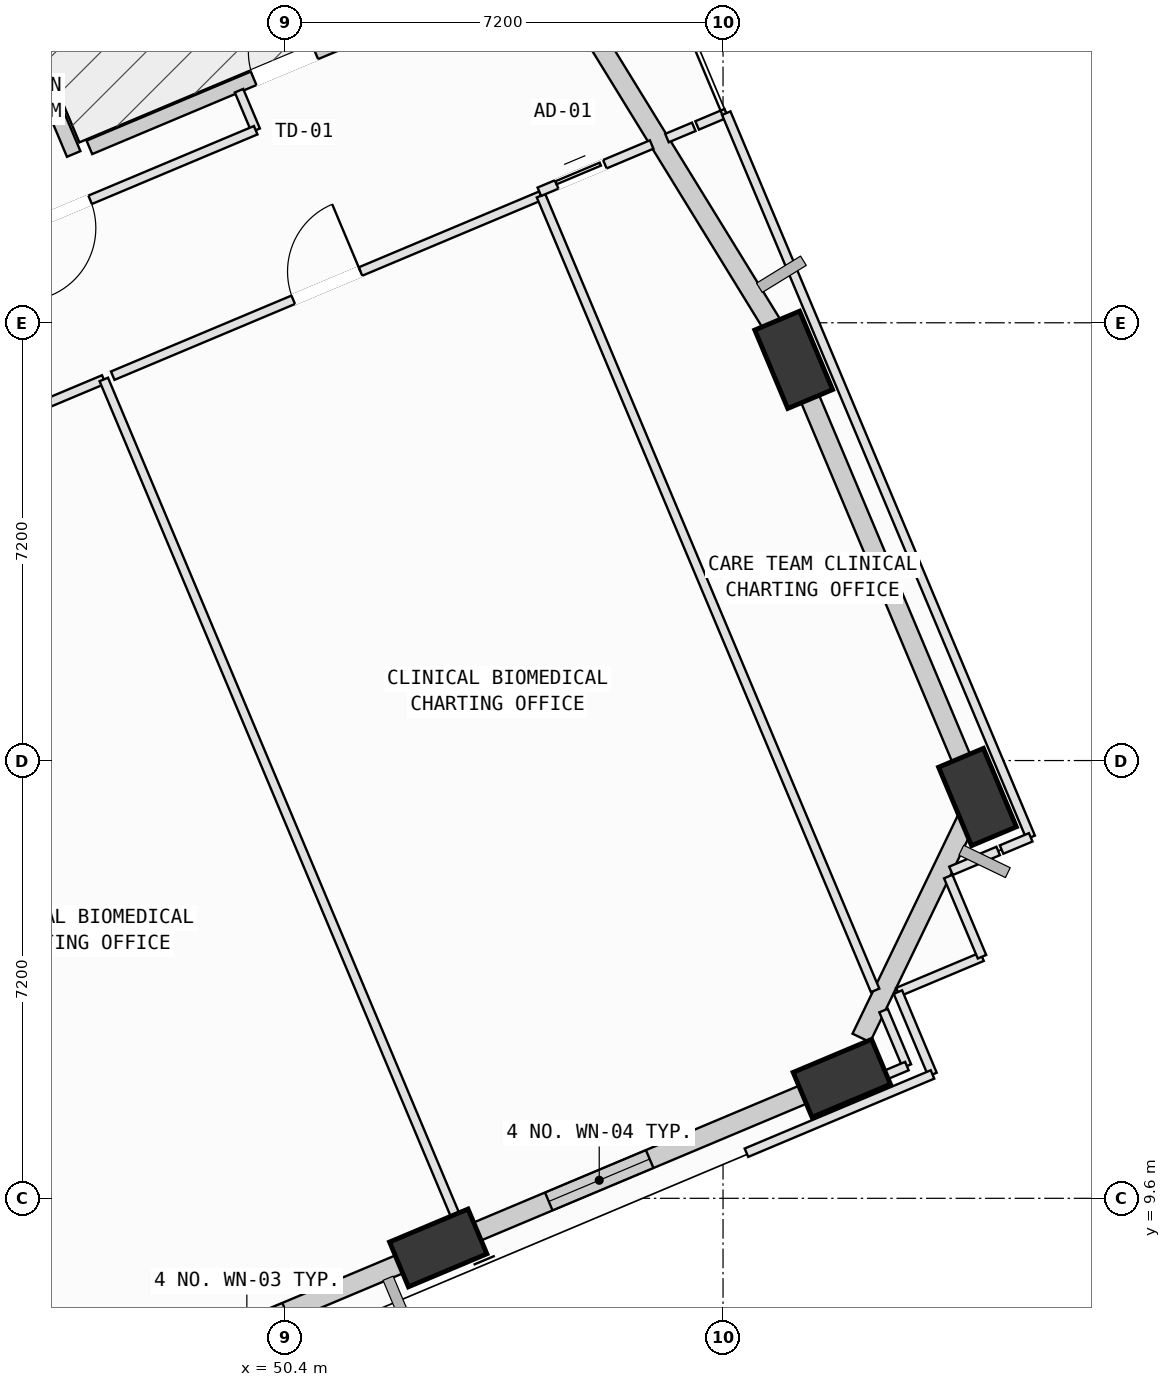
"""IFC4 building model, lengths in metres.
Left out: names, types, materials, properties, quantities, classifications, styles, units other than length and angle.
Written with IfcOpenShell. Run it as: python <this file> out.ifc"""

import sys

from ifc_helpers import new_model, si_unit, direction, frame, frame_2d, origin, origin_2d, place, context, subcontext, project, spatial, rectangle, extrude, element, fill, save


model = new_model("IFC4")
c1 = context("Model", 3, precision=1e-05, world=origin(), true_north=direction((0.0, 1.0)))
c2 = subcontext(c1, "Body", "Model", "MODEL_VIEW")
j1 = project(units=[si_unit("LENGTHUNIT", "METRE"), si_unit("PLANEANGLEUNIT", "RADIAN")], contexts=[c1])
p1 = place(None, origin())
s1 = spatial("IfcSite", under=j1, at=p1, CompositionType="ELEMENT")
p2 = place(p1, origin())
s2 = spatial("IfcBuilding", under=s1, at=p2, CompositionType="ELEMENT")
p3 = place(p2, frame((0.0, 0.0, 120.4)))
s3 = spatial("IfcBuildingStorey", under=s2, at=p3, CompositionType="ELEMENT", Elevation=120.4)
p4 = place(p3, frame((52.916, 8.784, 0.002), z_axis=(0.065381443896, 0.080146955854, 0.994636482471), x_axis=(-0.957968030834, 0.28406110417, 0.040081679075)))
e1 = element("IfcColumn", 1, at=p4, inside=s3, PredefinedType="COLUMN", context=c2, shape_type="SweptSolid", body=[
    extrude(rectangle(XDim=1.4, YDim=0.8, at=origin_2d()), origin(), (0.0, 0.0, 1.0), 4.018),
])
p5 = place(p3, frame((59.553, 11.574, 0.002), z_axis=(0.05349371523, 0.107290682814, 0.992787556234), x_axis=(-0.996668247407, 0.06703771327, 0.046458041385)))
e2 = element("IfcColumn", 2, at=p5, inside=s3, PredefinedType="COLUMN", context=c2, shape_type="SweptSolid", body=[
    extrude(rectangle(XDim=1.4, YDim=0.8, at=origin_2d()), origin(), (0.0, 0.0, 1.0), 4.025),
])
p6 = place(p3, frame((61.785, 16.2, 0.002), z_axis=(0.034443751906, 0.116247662682, 0.992622843217), x_axis=(0.111590657739, -0.987448779471, 0.111769553219)))
e3 = element("IfcColumn", 3, at=p6, inside=s3, PredefinedType="COLUMN", context=c2, shape_type="SweptSolid", body=[
    extrude(rectangle(XDim=1.4, YDim=0.8, at=origin_2d()), origin(), (0.0, 0.0, 1.0), 4.026),
])
p7 = place(p3, frame((58.762, 23.391, 0.002), z_axis=(0.004982357455, 0.103778860159, 0.994587916827), x_axis=(0.343101867735, -0.934402098194, 0.095780098391)))
e4 = element("IfcColumn", 4, at=p7, inside=s3, PredefinedType="COLUMN", context=c2, shape_type="SweptSolid", body=[
    extrude(rectangle(XDim=1.4, YDim=0.8, at=origin_2d()), origin(), (0.0, 0.0, 1.0), 4.018),
])
p8 = place(p3, frame((47.179, 26.885, 0.0), z_axis=(0.0, 0.0, 1.0), x_axis=(0.921869606689, 0.387500230018, 0.0)))
e5 = element("IfcWall", 5, at=p8, inside=s3, PredefinedType="SOLIDWALL", context=c2, shape_type="SweptSolid", body=[
    extrude(rectangle(XDim=6.96, YDim=0.24, at=frame_2d((3.48, 0.0))), origin(), (0.0, 0.0, 1.0), 2.945),
])
p9 = place(p8, frame((2.93, 0.0, 0.0)))
e6 = element("IfcOpeningElement", 6, at=p9, cuts=e5, PredefinedType="OPENING", context=c2, shape_type="SweptSolid", body=[
    extrude(rectangle(XDim=1.1, YDim=2.15, at=frame_2d((0.55, 1.075))), frame((0.0, 0.13, 0.0), z_axis=(0.0, -1.0, 0.0), x_axis=(1.0, 0.0, 0.0)), (0.0, 0.0, 1.0), 0.26),
])
p10 = place(p3, frame((45.952, 29.081, 0.0), z_axis=(0.0, 0.0, 1.0), x_axis=(0.387498107924, -0.92187049869, 0.0)))
e7 = element("IfcWall", 7, at=p10, inside=s3, PredefinedType="SOLIDWALL", context=c2, shape_type="SweptSolid", body=[
    extrude(rectangle(XDim=2.5, YDim=0.24, at=frame_2d((1.25, 0.0))), origin(), (0.0, 0.0, 1.0), 3.165),
])
p11 = place(p3, frame((52.637, 8.667, 0.0), z_axis=(0.0, 0.0, 1.0), x_axis=(-0.921850291978, -0.387546176836, 0.0)))
e8 = element("IfcWall", 8, at=p11, inside=s3, PredefinedType="SOLIDWALL", context=c2, shape_type="SweptSolid", body=[
    extrude(rectangle(XDim=6.219, YDim=0.32, at=frame_2d((3.109, 0.0))), origin(), (0.0, 0.0, 1.0), 3.165),
])
p12 = place(p11, frame((2.411, 0.0, 0.75)))
e9 = element("IfcOpeningElement", 9, at=p12, cuts=e8, PredefinedType="OPENING", context=c2, shape_type="SweptSolid", body=[
    extrude(rectangle(XDim=1.4, YDim=1.85, at=frame_2d((0.7, 0.925))), frame((0.0, 0.17, 0.0), z_axis=(0.0, -1.0, 0.0), x_axis=(1.0, 0.0, 0.0)), (0.0, 0.0, 1.0), 0.34),
])
p13 = place(p3, frame((59.288, 11.462, 0.0), z_axis=(0.0, 0.0, 1.0), x_axis=(-0.92186784653, -0.387504417438, 0.0)))
e10 = element("IfcWall", 10, at=p13, inside=s3, PredefinedType="SOLIDWALL", context=c2, shape_type="SweptSolid", body=[
    extrude(rectangle(XDim=6.242, YDim=0.32, at=frame_2d((3.121, 0.0))), origin(), (0.0, 0.0, 1.0), 3.165),
])
p14 = place(p13, frame((3.14, 0.0, 0.75)))
e11 = element("IfcOpeningElement", 11, at=p14, cuts=e10, PredefinedType="OPENING", context=c2, shape_type="SweptSolid", body=[
    extrude(rectangle(XDim=1.8, YDim=2.05, at=frame_2d((0.9, 1.025))), frame((0.0, 0.17, 0.0), z_axis=(0.0, -1.0, 0.0), x_axis=(1.0, 0.0, 0.0)), (0.0, 0.0, 1.0), 0.34),
])
p15 = place(p3, frame((61.675, 15.972, 0.0), z_axis=(0.0, 0.0, 1.0), x_axis=(-0.434493746085, -0.900674849551, 0.0)))
e12 = element("IfcWall", 12, at=p15, inside=s3, PredefinedType="SOLIDWALL", context=c2, shape_type="SweptSolid", body=[
    extrude(rectangle(XDim=4.145, YDim=0.32, at=frame_2d((2.073, 0.0))), origin(), (0.0, 0.0, 1.0), 3.165),
])
p16 = place(p3, frame((58.878, 23.115, 0.0), z_axis=(0.0, 0.0, 1.0), x_axis=(0.387495228719, -0.921871708927, 0.0)))
e13 = element("IfcWall", 13, at=p16, inside=s3, PredefinedType="SOLIDWALL", context=c2, shape_type="SweptSolid", body=[
    extrude(rectangle(XDim=6.84, YDim=0.32, at=frame_2d((3.42, 0.0))), origin(), (0.0, 0.0, 1.0), 3.165),
])
p17 = place(p3, frame((53.79, 31.476, 0.0), z_axis=(0.0, 0.0, 1.0), x_axis=(0.523829209883, -0.851823314352, 0.0)))
e14 = element("IfcWall", 14, at=p17, inside=s3, PredefinedType="SOLIDWALL", context=c2, shape_type="SweptSolid", body=[
    extrude(rectangle(XDim=8.838, YDim=0.32, at=frame_2d((4.419, 0.0))), origin(), (0.0, 0.0, 1.0), 3.165),
])
p18 = place(p3, frame((40.372, 20.108, 0.0), z_axis=(0.0, 0.0, 1.0), x_axis=(0.921900405163, 0.387426951774, 0.0)))
e15 = element("IfcWall", 15, at=p18, inside=s3, PredefinedType="PARTITIONING", context=c2, shape_type="SweptSolid", body=[
    extrude(rectangle(XDim=7.641, YDim=0.15, at=frame_2d((3.82, 0.0))), origin(), (0.0, 0.0, 1.0), 3.78),
])
p19 = place(p18, frame((3.22, 0.0, 0.0)))
e16 = element("IfcOpeningElement", 16, at=p19, cuts=e15, PredefinedType="OPENING", context=c2, shape_type="SweptSolid", body=[
    extrude(rectangle(XDim=1.2, YDim=2.15, at=frame_2d((0.6, 1.075))), frame((0.0, 0.085, 0.0), z_axis=(0.0, -1.0, 0.0), x_axis=(1.0, 0.0, 0.0)), (0.0, 0.0, 1.0), 0.17),
])
p20 = place(p3, frame((47.416, 23.068, 0.0), z_axis=(0.0, 0.0, 1.0), x_axis=(0.387521386552, -0.921860713429, 0.0)))
e17 = element("IfcWall", 17, at=p20, inside=s3, PredefinedType="PARTITIONING", context=c2, shape_type="SweptSolid", body=[
    extrude(rectangle(XDim=15.53, YDim=0.15, at=frame_2d((7.765, 0.0))), origin(), (0.0, 0.0, 1.0), 3.78),
])
p21 = place(p3, frame((53.434, 8.752, 0.0), z_axis=(0.0, 0.0, 1.0), x_axis=(-0.921754991199, -0.387772789401, 0.0)))
e18 = element("IfcWall", 18, at=p21, inside=s3, PredefinedType="PARTITIONING", context=c2, shape_type="SweptSolid", body=[
    extrude(rectangle(XDim=0.768, YDim=0.15, at=frame_2d((0.384, 0.0))), origin(), (0.0, 0.0, 1.0), 3.165),
])
p22 = place(p3, frame((47.563, 23.13, 0.0), z_axis=(0.0, 0.0, 1.0), x_axis=(0.921835553327, 0.387581233579, 0.0)))
e19 = element("IfcWall", 19, at=p22, inside=s3, PredefinedType="PARTITIONING", context=c2, shape_type="SweptSolid", body=[
    extrude(rectangle(XDim=7.64, YDim=0.15, at=frame_2d((3.82, 0.0))), origin(), (0.0, 0.0, 1.0), 3.78),
])
p23 = place(p22, frame((3.22, 0.0, 0.0)))
e20 = element("IfcOpeningElement", 20, at=p23, cuts=e19, PredefinedType="OPENING", context=c2, shape_type="SweptSolid", body=[
    extrude(rectangle(XDim=1.2, YDim=2.15, at=frame_2d((0.6, 1.075))), frame((0.0, 0.085, 0.0), z_axis=(0.0, -1.0, 0.0), x_axis=(1.0, 0.0, 0.0)), (0.0, 0.0, 1.0), 0.17),
])
p24 = place(p3, frame((54.606, 26.091, 0.0), z_axis=(0.0, 0.0, 1.0), x_axis=(0.387548900747, -0.92184914684, 0.0)))
e21 = element("IfcWall", 21, at=p24, inside=s3, PredefinedType="PARTITIONING", context=c2, shape_type="SweptSolid", body=[
    extrude(rectangle(XDim=14.179, YDim=0.15, at=frame_2d((7.09, 0.0))), origin(), (0.0, 0.0, 1.0), 3.78),
])
p25 = place(p3, frame((60.24, 12.688, 0.0), z_axis=(0.0, 0.0, 1.0), x_axis=(0.387693357822, -0.921788403214, 0.0)))
e22 = element("IfcWall", 22, at=p25, inside=s3, PredefinedType="PARTITIONING", context=c2, shape_type="SweptSolid", body=[
    extrude(rectangle(XDim=0.99, YDim=0.15, at=frame_2d((0.495, 0.0))), origin(), (0.0, 0.0, 1.0), 3.78),
])
p26 = place(p3, frame((60.624, 11.775, 0.0), z_axis=(0.0, 0.0, 1.0), x_axis=(-0.921940859641, -0.387330674391, 0.0)))
e23 = element("IfcWall", 23, at=p26, inside=s3, PredefinedType="PARTITIONING", context=c2, shape_type="SweptSolid", body=[
    extrude(rectangle(XDim=1.353, YDim=0.15, at=frame_2d((0.676, 0.0))), origin(), (0.0, 0.0, 1.0), 3.78),
])
p27 = place(p3, frame((49.64, 27.817, 0.0), z_axis=(0.0, 0.0, 1.0), x_axis=(0.388691323375, -0.921368034573, 0.0)))
e24 = element("IfcWall", 24, at=p27, inside=s3, PredefinedType="PARTITIONING", context=c2, shape_type="SweptSolid", body=[
    extrude(rectangle(XDim=0.705, YDim=0.15, at=frame_2d((0.353, 0.0))), origin(), (0.0, 0.0, 1.0), 3.78),
])
p28 = place(p3, frame((49.914, 27.167, 0.0), z_axis=(0.0, 0.0, 1.0), x_axis=(-0.921867857549, -0.387504391225, 0.0)))
e25 = element("IfcWall", 25, at=p28, inside=s3, PredefinedType="PARTITIONING", context=c2, shape_type="SweptSolid", body=[
    extrude(rectangle(XDim=5.373, YDim=0.15, at=frame_2d((2.687, 0.0))), origin(), (0.0, 0.0, 1.0), 2.945),
])
p29 = place(p28, frame((2.954, 0.0, 0.0)))
e26 = element("IfcOpeningElement", 26, at=p29, cuts=e25, PredefinedType="OPENING", context=c2, shape_type="SweptSolid", body=[
    extrude(rectangle(XDim=1.2, YDim=2.15, at=frame_2d((0.6, 1.075))), frame((0.0, 0.085, 0.0), z_axis=(0.0, -1.0, 0.0), x_axis=(1.0, 0.0, 0.0)), (0.0, 0.0, 1.0), 0.17),
])
p30 = place(p3, frame((61.859, 13.573, 0.0), z_axis=(0.0, 0.0, 1.0), x_axis=(-0.921917007589, -0.387387443161, 0.0)))
e27 = element("IfcWall", 27, at=p30, inside=s3, PredefinedType="PARTITIONING", context=c2, shape_type="SweptSolid", body=[
    extrude(rectangle(XDim=1.5, YDim=0.15, at=frame_2d((0.75, 0.0))), origin(), (0.0, 0.0, 1.0), 3.78),
])
p31 = place(p3, frame((60.476, 12.992, 0.0), z_axis=(0.0, 0.0, 1.0), x_axis=(0.38709125779, -0.922041408041, 0.0)))
e28 = element("IfcWall", 28, at=p31, inside=s3, PredefinedType="PARTITIONING", context=c2, shape_type="SweptSolid", body=[
    extrude(rectangle(XDim=1.469, YDim=0.15, at=frame_2d((0.735, 0.0))), origin(), (0.0, 0.0, 1.0), 3.78),
])
p32 = place(p3, frame((61.045, 11.637, 0.0), z_axis=(0.0, 0.0, 1.0), x_axis=(-0.921794510366, -0.387678837002, 0.0)))
e29 = element("IfcWall", 29, at=p32, inside=s3, PredefinedType="PARTITIONING", context=c2, shape_type="SweptSolid", body=[
    extrude(rectangle(XDim=3.319, YDim=0.15, at=frame_2d((1.66, 0.0))), origin(), (0.0, 0.0, 1.0), 3.78),
])
p33 = place(p3, frame((54.579, 26.155, 0.0), z_axis=(0.0, 0.0, 1.0), x_axis=(0.921777516639, 0.387719240971, 0.0)))
e30 = element("IfcWall", 30, at=p33, inside=s3, PredefinedType="PARTITIONING", context=c2, shape_type="SweptSolid", body=[
    extrude(rectangle(XDim=2.004, YDim=0.15, at=frame_2d((1.002, 0.0))), origin(), (0.0, 0.0, 1.0), 3.78),
])
p34 = place(p33, frame((0.309, 0.0, 0.0)))
e31 = element("IfcOpeningElement", 31, at=p34, cuts=e30, PredefinedType="OPENING", context=c2, shape_type="SweptSolid", body=[
    extrude(rectangle(XDim=0.86, YDim=2.06, at=frame_2d((0.43, 1.03))), frame((0.0, 0.085, 0.0), z_axis=(0.0, -1.0, 0.0), x_axis=(1.0, 0.0, 0.0)), (0.0, 0.0, 1.0), 0.17),
])
p35 = place(p3, frame((56.678, 27.038, 0.0), z_axis=(0.0, 0.0, 1.0), x_axis=(0.922258992791, 0.386572567853, 0.0)))
e32 = element("IfcWall", 32, at=p35, inside=s3, PredefinedType="PARTITIONING", context=c2, shape_type="SweptSolid", body=[
    extrude(rectangle(XDim=0.478, YDim=0.15, at=frame_2d((0.239, 0.0))), origin(), (0.0, 0.0, 1.0), 3.78),
])
p36 = place(p3, frame((62.125, 15.313, 0.0), z_axis=(0.0, 0.0, 1.0), x_axis=(-0.921542556587, -0.388277370444, 0.0)))
e33 = element("IfcWall", 33, at=p36, inside=s3, PredefinedType="PARTITIONING", context=c2, shape_type="SweptSolid", body=[
    extrude(rectangle(XDim=0.842, YDim=0.15, at=frame_2d((0.421, 0.0))), origin(), (0.0, 0.0, 1.0), 3.78),
])
p37 = place(p3, frame((61.304, 14.892, 0.0), z_axis=(0.0, 0.0, 1.0), x_axis=(0.387774788678, -0.921754150121, 0.0)))
e34 = element("IfcWall", 34, at=p37, inside=s3, PredefinedType="PARTITIONING", context=c2, shape_type="SweptSolid", body=[
    extrude(rectangle(XDim=1.431, YDim=0.15, at=frame_2d((0.716, 0.0))), origin(), (0.0, 0.0, 1.0), 3.78),
])
p38 = place(p3, frame((57.174, 27.246, 0.0), z_axis=(0.0, 0.0, 1.0), x_axis=(0.921485012844, 0.388413917238, 0.0)))
e35 = element("IfcWall", 35, at=p38, inside=s3, PredefinedType="PARTITIONING", context=c2, shape_type="SweptSolid", body=[
    extrude(rectangle(XDim=0.52, YDim=0.15, at=frame_2d((0.26, 0.0))), origin(), (0.0, 0.0, 1.0), 3.78),
])
p39 = place(p3, frame((57.653, 27.448, 0.0), z_axis=(0.0, 0.0, 1.0), x_axis=(0.387512914278, -0.921864274863, 0.0)))
e36 = element("IfcWall", 36, at=p39, inside=s3, PredefinedType="PARTITIONING", context=c2, shape_type="SweptSolid", body=[
    extrude(rectangle(XDim=12.92, YDim=0.15, at=frame_2d((6.46, 0.0))), origin(), (0.0, 0.0, 1.0), 3.165),
])
p40 = place(p3, frame((62.66, 15.537, 0.0), z_axis=(0.0, 0.0, 1.0), x_axis=(-0.921988816371, -0.387216505958, 0.0)))
e37 = element("IfcWall", 37, at=p40, inside=s3, PredefinedType="PARTITIONING", context=c2, shape_type="SweptSolid", body=[
    extrude(rectangle(XDim=0.52, YDim=0.15, at=frame_2d((0.26, 0.0))), origin(), (0.0, 0.0, 1.0), 3.78),
])
p41 = place(p9, origin())
e38 = element("IfcDoor", 38, at=p41, inside=s3, OperationType="SINGLE_SWING_RIGHT", PredefinedType="DOOR", context=c2, shape_type="SweptSolid", body=[
    extrude(rectangle(XDim=1.1, YDim=2.15, at=frame_2d((0.55, 1.075))), frame((0.0, 0.025, 0.0), z_axis=(0.0, -1.0, 0.0), x_axis=(1.0, 0.0, 0.0)), (0.0, 0.0, 1.0), 0.05),
])
fill(e6, e38)
p42 = place(p14, origin())
e39 = element("IfcWindow", 39, at=p42, inside=s3, PartitioningType="SINGLE_PANEL", PredefinedType="WINDOW", context=c2, shape_type="SweptSolid", body=[
    extrude(rectangle(XDim=1.8, YDim=2.05, at=frame_2d((0.9, 1.025))), frame((0.0, 0.03, 0.0), z_axis=(0.0, -1.0, 0.0), x_axis=(1.0, 0.0, 0.0)), (0.0, 0.0, 1.0), 0.06),
])
fill(e11, e39)
p43 = place(p23, origin())
e40 = element("IfcDoor", 40, at=p43, inside=s3, OperationType="SINGLE_SWING_RIGHT", PredefinedType="DOOR", context=c2, shape_type="SweptSolid", body=[
    extrude(rectangle(XDim=1.2, YDim=2.15, at=frame_2d((0.6, 1.075))), frame((0.0, 0.025, 0.0), z_axis=(0.0, -1.0, 0.0), x_axis=(1.0, 0.0, 0.0)), (0.0, 0.0, 1.0), 0.05),
])
fill(e20, e40)
p44 = place(p29, origin())
e41 = element("IfcDoor", 41, at=p44, inside=s3, OperationType="SINGLE_SWING_RIGHT", PredefinedType="DOOR", context=c2, shape_type="SweptSolid", body=[
    extrude(rectangle(XDim=1.2, YDim=2.15, at=frame_2d((0.6, 1.075))), frame((0.0, 0.025, 0.0), z_axis=(0.0, -1.0, 0.0), x_axis=(1.0, 0.0, 0.0)), (0.0, 0.0, 1.0), 0.05),
])
fill(e26, e41)
p45 = place(p34, origin())
e42 = element("IfcDoor", 42, at=p45, inside=s3, OperationType="SLIDING_TO_LEFT", PredefinedType="DOOR", context=c2, shape_type="SweptSolid", body=[
    extrude(rectangle(XDim=0.86, YDim=2.06, at=frame_2d((0.43, 1.03))), frame((0.0, 0.025, 0.0), z_axis=(0.0, -1.0, 0.0), x_axis=(1.0, 0.0, 0.0)), (0.0, 0.0, 1.0), 0.05),
])
fill(e31, e42)
save(model, sys.argv[1])
